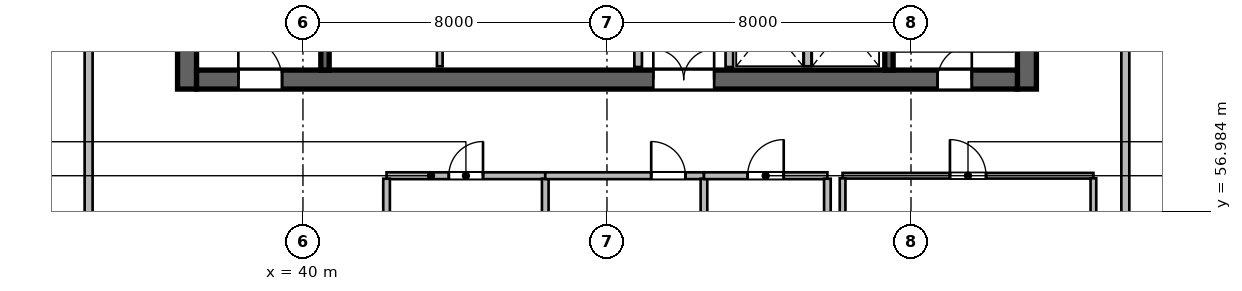
"""IFC4 building model, lengths in metres.
Left out: names, types, materials, properties, quantities, classifications, styles, units other than length and angle.
Written with IfcOpenShell. Run it as: python <this file> out.ifc"""

import sys

from ifc_helpers import new_model, si_unit, direction, frame, frame_2d, origin, place, context, subcontext, project, spatial, rectangle, extrude, source, transform, mapped, element, fill, save


model = new_model("IFC4")
c1 = context("Model", 3, precision=1e-05, world=origin(), true_north=direction((0.0, 1.0)))
c2 = subcontext(c1, "Body", "Model", "MODEL_VIEW")
j1 = project(units=[si_unit("LENGTHUNIT", "METRE"), si_unit("PLANEANGLEUNIT", "RADIAN")], contexts=[c1])
p1 = place(None, origin())
s1 = spatial("IfcSite", under=j1, at=p1, CompositionType="ELEMENT")
p2 = place(p1, origin())
s2 = spatial("IfcBuilding", under=s1, at=p2, CompositionType="ELEMENT")
p3 = place(p2, frame((0.0, 0.0, 135.0)))
s3 = spatial("IfcBuildingStorey", under=s2, at=p3, CompositionType="ELEMENT", Elevation=135.0)
m1 = source(origin(), c2, "Body", "SweptSolid", [
    extrude(rectangle(XDim=12.0, YDim=0.5, at=frame_2d((6.0, 0.0))), origin(), (0.0, 0.0, 1.0), 3.9),
])
for number, where, z_axis, x_axis in (
    (1, (36.95, 60.2, 0.0), (0.0, 0.0, 1.0), (0.0, 1.0, 0.0)),
    (2, (59.05, 60.2, 0.0), (0.0, 0.0, 1.0), (0.0, 1.0, 0.0)),
):
    element("IfcWall", number, at=place(p3, frame(where, z_axis=z_axis, x_axis=x_axis)), inside=s3, PredefinedType="SHEAR", context=c2, shape_type="MappedRepresentation", body=[
        mapped(m1, transform((0.0, 0.0, 0.0), scale=1.0)),
    ])
m2 = source(origin(), c2, "Body", "SweptSolid", [
    extrude(rectangle(XDim=21.6, YDim=0.5, at=frame_2d((10.8, 0.0))), origin(), (0.0, 0.0, 1.0), 3.9),
])
p4 = place(p3, frame((37.2, 60.45, 0.0), z_axis=(0.0, 0.0, 1.0), x_axis=(1.0, 0.0, 0.0)))
e3 = element("IfcWall", 3, at=p4, inside=s3, PredefinedType="SHEAR", context=c2, shape_type="MappedRepresentation", body=[
    mapped(m2, transform((0.0, 0.0, 0.0), scale=1.0)),
])
p5 = place(p4, frame((1.1, 0.0, 0.0)))
e4 = element("IfcOpeningElement", 4, at=p5, cuts=e3, PredefinedType="OPENING", context=c2, shape_type="SweptSolid", body=[
    extrude(rectangle(XDim=1.15, YDim=2.15, at=frame_2d((0.575, 1.075))), frame((0.0, 0.26, 0.0), z_axis=(0.0, -1.0, 0.0), x_axis=(1.0, 0.0, 0.0)), (0.0, 0.0, 1.0), 0.52),
])
p6 = place(p4, frame((19.5, 0.0, 0.0)))
e5 = element("IfcOpeningElement", 5, at=p6, cuts=e3, PredefinedType="OPENING", context=c2, shape_type="SweptSolid", body=[
    extrude(rectangle(XDim=0.9, YDim=2.1, at=frame_2d((0.45, 1.05))), frame((0.0, 0.26, 0.0), z_axis=(0.0, -1.0, 0.0), x_axis=(1.0, 0.0, 0.0)), (0.0, 0.0, 1.0), 0.52),
])
p7 = place(p4, frame((12.02, 0.0, 0.0)))
e6 = element("IfcOpeningElement", 6, at=p7, cuts=e3, PredefinedType="OPENING", context=c2, shape_type="SweptSolid", body=[
    extrude(rectangle(XDim=1.6, YDim=2.15, at=frame_2d((0.8, 1.075))), frame((0.0, 0.26, 0.0), z_axis=(0.0, -1.0, 0.0), x_axis=(1.0, 0.0, 0.0)), (0.0, 0.0, 1.0), 0.52),
])
m3 = source(origin(), c2, "Body", "SweptSolid", [
    extrude(rectangle(XDim=11.0, YDim=0.22, at=frame_2d((5.5, 0.0))), origin(), (0.0, 0.0, 1.0), 3.9),
])
p8 = place(p3, frame((40.58, 60.7, 0.0), z_axis=(0.0, 0.0, 1.0), x_axis=(0.0, 1.0, 0.0)))
e7 = element("IfcWall", 7, at=p8, inside=s3, PredefinedType="SHEAR", context=c2, shape_type="MappedRepresentation", body=[
    mapped(m3, transform((0.0, 0.0, 0.0), scale=1.0)),
])
p9 = place(p3, frame((55.42, 60.7, 0.0), z_axis=(0.0, 0.0, 1.0), x_axis=(0.0, 1.0, 0.0)))
e8 = element("IfcWall", 8, at=p9, inside=s3, PredefinedType="SHEAR", context=c2, shape_type="MappedRepresentation", body=[
    mapped(m3, transform((0.0, 0.0, 0.0), scale=1.0)),
])
p10 = place(p9, frame((9.545, 0.0, 0.0)))
e9 = element("IfcOpeningElement", 9, at=p10, cuts=e8, PredefinedType="OPENING", context=c2, shape_type="SweptSolid", body=[
    extrude(rectangle(XDim=1.15, YDim=2.15, at=frame_2d((0.575, 1.075))), frame((0.0, 0.12, 0.0), z_axis=(0.0, -1.0, 0.0), x_axis=(1.0, 0.0, 0.0)), (0.0, 0.0, 1.0), 0.24),
])
m4 = source(origin(), c2, "Body", "SweptSolid", [
    extrude(rectangle(XDim=2.24, YDim=0.2, at=frame_2d((1.12, 0.0))), origin(), (0.0, 0.0, 1.0), 3.65),
])
for number, where, z_axis, x_axis in (
    (10, (48.82, 60.78, 0.0), (0.0, 0.0, 1.0), (0.0, 1.0, 0.0)),
    (11, (51.22, 60.78, 0.0), (0.0, 0.0, 1.0), (0.0, 1.0, 0.0)),
):
    element("IfcWall", number, at=place(p3, frame(where, z_axis=z_axis, x_axis=x_axis)), inside=s3, PredefinedType="SOLIDWALL", context=c2, shape_type="MappedRepresentation", body=[
        mapped(m4, transform((0.0, 0.0, 0.0), scale=1.0)),
    ])
m5 = source(origin(), c2, "Body", "SweptSolid", [
    extrude(rectangle(XDim=2.2, YDim=0.15, at=frame_2d((1.1, 0.0))), origin(), (0.0, 0.0, 1.0), 3.65),
])
p11 = place(p3, frame((43.6, 60.8, 0.0), z_axis=(0.0, 0.0, 1.0), x_axis=(0.0, 1.0, 0.0)))
e12 = element("IfcWall", 12, at=p11, inside=s3, PredefinedType="PARTITIONING", context=c2, shape_type="MappedRepresentation", body=[
    mapped(m5, transform((0.0, 0.0, 0.0), scale=1.0)),
])
m6 = source(origin(), c2, "Body", "SweptSolid", [
    extrude(rectangle(XDim=2.2, YDim=0.2, at=frame_2d((1.1, 0.0))), origin(), (0.0, 0.0, 1.0), 3.65),
])
p12 = place(p3, frame((53.28, 60.8, 0.0), z_axis=(0.0, 0.0, 1.0), x_axis=(0.0, 1.0, 0.0)))
e13 = element("IfcWall", 13, at=p12, inside=s3, PredefinedType="SOLIDWALL", context=c2, shape_type="MappedRepresentation", body=[
    mapped(m6, transform((0.0, 0.0, 0.0), scale=1.0)),
])
m7 = source(origin(), c2, "Body", "SweptSolid", [
    extrude(rectangle(XDim=4.176, YDim=0.18, at=frame_2d((2.088, 0.0))), origin(), (0.0, 0.0, 1.0), 3.65),
])
p13 = place(p3, frame((42.2, 57.92, 0.0), z_axis=(0.0, 0.0, 1.0), x_axis=(1.0, 0.0, 0.0)))
e14 = element("IfcWall", 14, at=p13, inside=s3, PredefinedType="PLUMBINGWALL", context=c2, shape_type="MappedRepresentation", body=[
    mapped(m7, transform((0.0, 0.0, 0.0), scale=1.0)),
])
p14 = place(p13, frame((1.638, 0.0, 0.0)))
e15 = element("IfcOpeningElement", 15, at=p14, cuts=e14, PredefinedType="OPENING", context=c2, shape_type="SweptSolid", body=[
    extrude(rectangle(XDim=0.9, YDim=2.08, at=frame_2d((0.45, 1.04))), frame((0.0, 0.1, 0.0), z_axis=(0.0, -1.0, 0.0), x_axis=(1.0, 0.0, 0.0)), (0.0, 0.0, 1.0), 0.2),
])
m8 = source(origin(), c2, "Body", "SweptSolid", [
    extrude(rectangle(XDim=3.763, YDim=0.175, at=frame_2d((1.881, 0.0))), origin(), (0.0, 0.0, 1.0), 3.65),
])
for number, where, z_axis, x_axis in (
    (16, (42.2, 54.079, 0.0), (0.0, 0.0, 1.0), (0.0, 1.0, 0.0)),
    (17, (46.376, 54.079, 0.0), (0.0, 0.0, 1.0), (0.0, 1.0, 0.0)),
):
    element("IfcWall", number, at=place(p3, frame(where, z_axis=z_axis, x_axis=x_axis)), inside=s3, PredefinedType="PARTITIONING", context=c2, shape_type="MappedRepresentation", body=[
        mapped(m8, transform((0.0, 0.0, 0.0), scale=1.0)),
    ])
p15 = place(p3, frame((46.376, 57.92, 0.0), z_axis=(0.0, 0.0, 1.0), x_axis=(1.0, 0.0, 0.0)))
e18 = element("IfcWall", 18, at=p15, inside=s3, PredefinedType="PLUMBINGWALL", context=c2, shape_type="MappedRepresentation", body=[
    mapped(m7, transform((0.0, 0.0, 0.0), scale=1.0)),
])
p16 = place(p15, frame((2.788, 0.0, 0.0)))
e19 = element("IfcOpeningElement", 19, at=p16, cuts=e18, PredefinedType="OPENING", context=c2, shape_type="SweptSolid", body=[
    extrude(rectangle(XDim=0.9, YDim=2.08, at=frame_2d((0.45, 1.04))), frame((0.0, 0.1, 0.0), z_axis=(0.0, -1.0, 0.0), x_axis=(1.0, 0.0, 0.0)), (0.0, 0.0, 1.0), 0.2),
])
p17 = place(p3, frame((50.552, 54.079, 0.0), z_axis=(0.0, 0.0, 1.0), x_axis=(0.0, 1.0, 0.0)))
e20 = element("IfcWall", 20, at=p17, inside=s3, PredefinedType="PARTITIONING", context=c2, shape_type="MappedRepresentation", body=[
    mapped(m8, transform((0.0, 0.0, 0.0), scale=1.0)),
])
m9 = source(origin(), c2, "Body", "SweptSolid", [
    extrude(rectangle(XDim=3.248, YDim=0.18, at=frame_2d((1.624, 0.0))), origin(), (0.0, 0.0, 1.0), 3.65),
])
p18 = place(p3, frame((50.552, 57.92, 0.0), z_axis=(0.0, 0.0, 1.0), x_axis=(1.0, 0.0, 0.0)))
e21 = element("IfcWall", 21, at=p18, inside=s3, PredefinedType="PLUMBINGWALL", context=c2, shape_type="MappedRepresentation", body=[
    mapped(m9, transform((0.0, 0.0, 0.0), scale=1.0)),
])
p19 = place(p18, frame((1.149, 0.0, 0.0)))
e22 = element("IfcOpeningElement", 22, at=p19, cuts=e21, PredefinedType="OPENING", context=c2, shape_type="SweptSolid", body=[
    extrude(rectangle(XDim=0.95, YDim=2.12, at=frame_2d((0.475, 1.06))), frame((0.0, 0.1, 0.0), z_axis=(0.0, -1.0, 0.0), x_axis=(1.0, 0.0, 0.0)), (0.0, 0.0, 1.0), 0.2),
])
p20 = place(p3, frame((53.8, 54.079, 0.0), z_axis=(0.0, 0.0, 1.0), x_axis=(0.0, 1.0, 0.0)))
e23 = element("IfcWall", 23, at=p20, inside=s3, PredefinedType="PARTITIONING", context=c2, shape_type="MappedRepresentation", body=[
    mapped(m8, transform((0.0, 0.0, 0.0), scale=1.0)),
])
m10 = source(origin(), c2, "Body", "SweptSolid", [
    extrude(rectangle(XDim=6.6, YDim=0.15, at=frame_2d((3.3, 0.0))), origin(), (0.0, 0.0, 1.0), 3.65),
])
p21 = place(p3, frame((54.2, 57.92, 0.0), z_axis=(0.0, 0.0, 1.0), x_axis=(1.0, 0.0, 0.0)))
e24 = element("IfcWall", 24, at=p21, inside=s3, PredefinedType="PARTITIONING", context=c2, shape_type="MappedRepresentation", body=[
    mapped(m10, transform((0.0, 0.0, 0.0), scale=1.0)),
])
p22 = place(p21, frame((2.825, 0.0, 0.0)))
e25 = element("IfcOpeningElement", 25, at=p22, cuts=e24, PredefinedType="OPENING", context=c2, shape_type="SweptSolid", body=[
    extrude(rectangle(XDim=0.95, YDim=2.1, at=frame_2d((0.475, 1.05))), frame((0.0, 0.085, 0.0), z_axis=(0.0, -1.0, 0.0), x_axis=(1.0, 0.0, 0.0)), (0.0, 0.0, 1.0), 0.17),
])
m11 = source(origin(), c2, "Body", "SweptSolid", [
    extrude(rectangle(XDim=3.785, YDim=0.15, at=frame_2d((1.893, 0.0))), origin(), (0.0, 0.0, 1.0), 3.65),
])
for number, where, z_axis, x_axis in (
    (26, (54.2, 54.067, 0.0), (0.0, 0.0, 1.0), (0.0, 1.0, 0.0)),
    (27, (60.8, 54.067, 0.0), (0.0, 0.0, 1.0), (0.0, 1.0, 0.0)),
):
    element("IfcWall", number, at=place(p3, frame(where, z_axis=z_axis, x_axis=x_axis)), inside=s3, PredefinedType="PARTITIONING", context=c2, shape_type="MappedRepresentation", body=[
        mapped(m11, transform((0.0, 0.0, 0.0), scale=1.0)),
    ])
m12 = source(origin(), c2, "Body", "SweptSolid", [
    extrude(rectangle(XDim=13.988, YDim=0.21, at=frame_2d((6.994, 0.0))), origin(), (0.0, 0.0, 1.0), 3.65),
])
p23 = place(p3, frame((34.36, 47.472, 0.0), z_axis=(0.0, 0.0, 1.0), x_axis=(0.0, 1.0, 0.0)))
e28 = element("IfcWall", 28, at=p23, inside=s3, PredefinedType="PARTITIONING", context=c2, shape_type="MappedRepresentation", body=[
    mapped(m12, transform((0.0, 0.0, 0.0), scale=1.0)),
])
m13 = source(origin(), c2, "Body", "SweptSolid", [
    extrude(rectangle(XDim=13.988, YDim=0.21, at=frame_2d((6.994, 0.0))), origin(), (0.0, 0.0, 1.0), 2.942),
])
p24 = place(p3, frame((61.64, 47.472, 0.0), z_axis=(0.0, 0.0, 1.0), x_axis=(0.0, 1.0, 0.0)))
e29 = element("IfcWall", 29, at=p24, inside=s3, PredefinedType="PARTITIONING", context=c2, shape_type="MappedRepresentation", body=[
    mapped(m13, transform((0.0, 0.0, 0.0), scale=1.0)),
])
m14 = source(origin(), c2, "Body", "SweptSolid", [
    extrude(rectangle(XDim=1.15, YDim=2.15, at=frame_2d((0.575, 1.075))), frame((0.0, 0.025, 0.0), z_axis=(0.0, -1.0, 0.0), x_axis=(1.0, 0.0, 0.0)), (0.0, 0.0, 1.0), 0.05),
])
p25 = place(p5, origin())
e30 = element("IfcDoor", 30, at=p25, inside=s3, OperationType="SINGLE_SWING_LEFT", PredefinedType="DOOR", context=c2, shape_type="MappedRepresentation", body=[
    mapped(m14, transform((0.0, 0.0, 0.0), scale=1.0)),
])
fill(e4, e30)
m15 = source(origin(), c2, "Body", "SweptSolid", [
    extrude(rectangle(XDim=0.9, YDim=2.1, at=frame_2d((0.45, 1.05))), frame((0.0, 0.025, 0.0), z_axis=(0.0, -1.0, 0.0), x_axis=(1.0, 0.0, 0.0)), (0.0, 0.0, 1.0), 0.05),
])
p26 = place(p6, origin())
e31 = element("IfcDoor", 31, at=p26, inside=s3, OperationType="SINGLE_SWING_RIGHT", PredefinedType="DOOR", context=c2, shape_type="MappedRepresentation", body=[
    mapped(m15, transform((0.0, 0.0, 0.0), scale=1.0)),
])
fill(e5, e31)
m16 = source(origin(), c2, "Body", "SweptSolid", [
    extrude(rectangle(XDim=1.6, YDim=2.15, at=frame_2d((0.8, 1.075))), frame((0.0, 0.025, 0.0), z_axis=(0.0, -1.0, 0.0), x_axis=(1.0, 0.0, 0.0)), (0.0, 0.0, 1.0), 0.05),
])
p27 = place(p7, origin())
e32 = element("IfcDoor", 32, at=p27, inside=s3, OperationType="DOUBLE_DOOR_SINGLE_SWING", PredefinedType="DOOR", context=c2, shape_type="MappedRepresentation", body=[
    mapped(m16, transform((0.0, 0.0, 0.0), scale=1.0)),
])
fill(e6, e32)
m17 = source(origin(), c2, "Body", "SweptSolid", [
    extrude(rectangle(XDim=0.9, YDim=2.08, at=frame_2d((0.45, 1.04))), frame((0.0, 0.025, 0.0), z_axis=(0.0, -1.0, 0.0), x_axis=(1.0, 0.0, 0.0)), (0.0, 0.0, 1.0), 0.05),
])
p28 = place(p14, origin())
e33 = element("IfcDoor", 33, at=p28, inside=s3, OperationType="SINGLE_SWING_RIGHT", PredefinedType="DOOR", context=c2, shape_type="MappedRepresentation", body=[
    mapped(m17, transform((0.0, 0.0, 0.0), scale=1.0)),
])
fill(e15, e33)
p29 = place(p16, origin())
e34 = element("IfcDoor", 34, at=p29, inside=s3, OperationType="SINGLE_SWING_LEFT", PredefinedType="DOOR", context=c2, shape_type="MappedRepresentation", body=[
    mapped(m17, transform((0.0, 0.0, 0.0), scale=1.0)),
])
fill(e19, e34)
m18 = source(origin(), c2, "Body", "SweptSolid", [
    extrude(rectangle(XDim=0.95, YDim=2.12, at=frame_2d((0.475, 1.06))), frame((0.0, 0.025, 0.0), z_axis=(0.0, -1.0, 0.0), x_axis=(1.0, 0.0, 0.0)), (0.0, 0.0, 1.0), 0.05),
])
p30 = place(p19, origin())
e35 = element("IfcDoor", 35, at=p30, inside=s3, OperationType="SINGLE_SWING_RIGHT", PredefinedType="DOOR", context=c2, shape_type="MappedRepresentation", body=[
    mapped(m18, transform((0.0, 0.0, 0.0), scale=1.0)),
])
fill(e22, e35)
m19 = source(origin(), c2, "Body", "SweptSolid", [
    extrude(rectangle(XDim=0.95, YDim=2.1, at=frame_2d((0.475, 1.05))), frame((0.0, 0.025, 0.0), z_axis=(0.0, -1.0, 0.0), x_axis=(1.0, 0.0, 0.0)), (0.0, 0.0, 1.0), 0.05),
])
p31 = place(p22, origin())
e36 = element("IfcDoor", 36, at=p31, inside=s3, OperationType="SINGLE_SWING_LEFT", PredefinedType="DOOR", context=c2, shape_type="MappedRepresentation", body=[
    mapped(m19, transform((0.0, 0.0, 0.0), scale=1.0)),
])
fill(e25, e36)
save(model, sys.argv[1])
